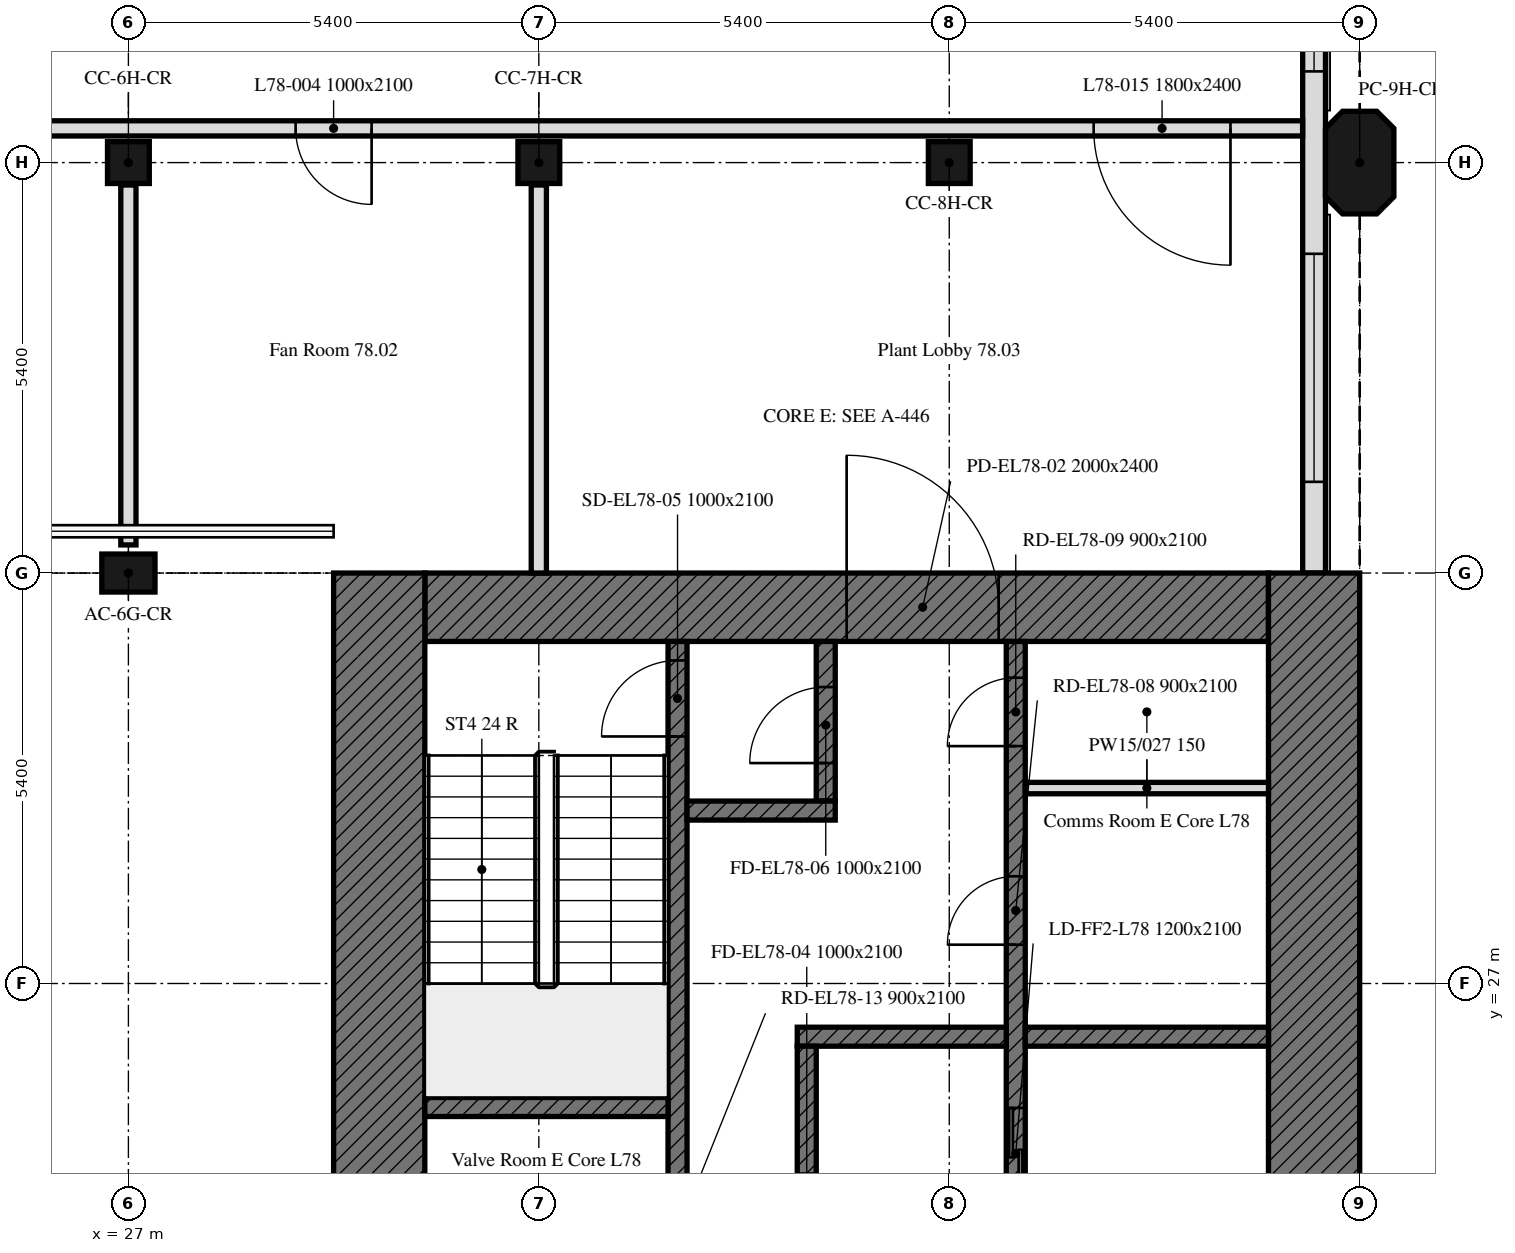
"""IFC4 building model, lengths in metres.
Left out: names, types, materials, properties, quantities, classifications, styles, units other than length and angle.
Written with IfcOpenShell. Run it as: python <this file> out.ifc"""

import sys

from ifc_helpers import new_model, si_unit, direction, frame, frame_2d, origin, origin_2d, place, context, subcontext, project, spatial, polyline, rectangle, outline, extrude, element, fill, save


model = new_model("IFC4")
c1 = context("Model", 3, precision=1e-05, world=origin(), true_north=direction((0.0, 1.0)))
c2 = subcontext(c1, "Body", "Model", "MODEL_VIEW")
j1 = project(units=[si_unit("LENGTHUNIT", "METRE"), si_unit("PLANEANGLEUNIT", "RADIAN")], contexts=[c1])
p1 = place(None, origin())
s1 = spatial("IfcSite", under=j1, at=p1, CompositionType="ELEMENT")
p2 = place(p1, origin())
s2 = spatial("IfcBuilding", under=s1, at=p2, CompositionType="ELEMENT")
p3 = place(p2, frame((0.0, 0.0, 312.7)))
s3 = spatial("IfcBuildingStorey", under=s2, at=p3, CompositionType="ELEMENT", Elevation=312.7)
p4 = place(p3, frame((27.0, 32.4, 0.0), z_axis=(0.0, 0.0, 1.0), x_axis=(1.0, 0.0, 0.0)))
e1 = element("IfcColumn", 1, at=p4, inside=s3, PredefinedType="COLUMN", context=c2, shape_type="SweptSolid", body=[
    extrude(rectangle(XDim=0.7, YDim=0.5, at=origin_2d()), origin(), (0.0, 0.0, 1.0), 4.2),
])
for number, where, z_axis, x_axis in (
    (2, (27.0, 37.8, 0.0), (0.0, 0.0, 1.0), (1.0, 0.0, 0.0)),
    (3, (32.4, 37.8, 0.0), (0.0, 0.0, 1.0), (1.0, 0.0, 0.0)),
    (4, (37.8, 37.8, 0.0), (0.0, 0.0, 1.0), (1.0, 0.0, 0.0)),
):
    element("IfcColumn", number, at=place(p3, frame(where, z_axis=z_axis, x_axis=x_axis)), inside=s3, PredefinedType="COLUMN", context=c2, shape_type="SweptSolid", body=[
        extrude(rectangle(XDim=0.55, YDim=0.55, at=origin_2d()), origin(), (0.0, 0.0, 1.0), 4.2),
    ])
p5 = place(p3, frame((43.2, 37.8, 0.0), z_axis=(0.0, 0.0, 1.0), x_axis=(0.0, 1.0, 0.0)))
e5 = element("IfcColumn", 5, at=p5, inside=s3, PredefinedType="COLUMN", context=c2, shape_type="SweptSolid", body=[
    extrude(outline(polyline([(-0.45, -0.45), (0.45, -0.45), (0.675, -0.225), (0.675, 0.225), (0.45, 0.45), (-0.45, 0.45), (-0.675, 0.225), (-0.675, -0.225), (-0.45, -0.45)])), origin(), (0.0, 0.0, 1.0), 4.2),
])
p6 = place(p3, frame((42.6, 32.4, 0.0), z_axis=(0.0, 0.0, 1.0), x_axis=(0.0, 1.0, 0.0)))
e6 = element("IfcWall", 6, at=p6, inside=s3, PredefinedType="SOLIDWALL", context=c2, shape_type="SweptSolid", body=[
    extrude(outline(polyline([(0.0, 0.0), (10.614, 0.0), (10.614, 4.2), (10.024, 4.2), (9.434, 4.2), (8.845, 4.2), (8.255, 4.2), (7.665, 4.2), (7.076, 4.2), (6.486, 4.2), (5.896, 4.2), (5.307, 4.2), (4.717, 4.2), (4.127, 4.2), (3.538, 4.2), (2.948, 4.2), (2.359, 4.2), (1.769, 4.2), (1.179, 4.2), (0.59, 4.2), (0.0, 4.2), (0.0, 0.0)])), frame((0.0, 0.15, 0.0), z_axis=(0.0, -1.0, 0.0), x_axis=(1.0, 0.0, 0.0)), (0.0, 0.0, 1.0), 0.3),
])
p7 = place(p6, frame((1.2, 0.0, 0.6)))
e7 = element("IfcOpeningElement", 7, at=p7, cuts=e6, PredefinedType="OPENING", context=c2, shape_type="SweptSolid", body=[
    extrude(rectangle(XDim=3.0, YDim=1.8, at=frame_2d((1.5, 0.9))), frame((0.0, 0.16, 0.0), z_axis=(0.0, -1.0, 0.0), x_axis=(1.0, 0.0, 0.0)), (0.0, 0.0, 1.0), 0.32),
])
p8 = place(p6, frame((6.6, 0.0, 0.6)))
e8 = element("IfcOpeningElement", 8, at=p8, cuts=e6, PredefinedType="OPENING", context=c2, shape_type="SweptSolid", body=[
    extrude(rectangle(XDim=3.0, YDim=1.8, at=frame_2d((1.5, 0.9))), frame((0.0, 0.16, 0.0), z_axis=(0.0, -1.0, 0.0), x_axis=(1.0, 0.0, 0.0)), (0.0, 0.0, 1.0), 0.32),
])
p9 = place(p3, frame((30.9, 31.95, 0.0), z_axis=(0.0, 0.0, 1.0), x_axis=(1.0, 0.0, 0.0)))
e9 = element("IfcWall", 9, at=p9, inside=s3, PredefinedType="SOLIDWALL", context=c2, shape_type="SweptSolid", body=[
    extrude(rectangle(XDim=11.1, YDim=0.9, at=frame_2d((5.55, 0.0))), origin(), (0.0, 0.0, 1.0), 4.2),
])
p10 = place(p9, frame((5.55, 0.0, 0.0)))
e10 = element("IfcOpeningElement", 10, at=p10, cuts=e9, PredefinedType="OPENING", context=c2, shape_type="SweptSolid", body=[
    extrude(rectangle(XDim=2.0, YDim=2.4, at=frame_2d((1.0, 1.2))), frame((0.0, 0.45, 0.0), z_axis=(0.0, -1.0, 0.0), x_axis=(1.0, 0.0, 0.0)), (0.0, 0.0, 1.0), 0.9),
])
for number, where, z_axis, x_axis in (
    (11, (42.6, 32.4, 0.0), (0.0, 0.0, 1.0), (0.0, -1.0, 0.0)),
    (12, (30.3, 16.2, 0.0), (0.0, 0.0, 1.0), (0.0, 1.0, 0.0)),
):
    element("IfcWall", number, at=place(p3, frame(where, z_axis=z_axis, x_axis=x_axis)), inside=s3, PredefinedType="SOLIDWALL", context=c2, shape_type="SweptSolid", body=[
        extrude(rectangle(XDim=16.2, YDim=1.2, at=frame_2d((8.1, 0.0))), origin(), (0.0, 0.0, 1.0), 4.2),
    ])
p11 = place(p3, frame((38.675, 17.1, 0.0), z_axis=(0.0, 0.0, 1.0), x_axis=(0.0, 1.0, 0.0)))
e13 = element("IfcWall", 13, at=p11, inside=s3, PredefinedType="SOLIDWALL", context=c2, shape_type="SweptSolid", body=[
    extrude(rectangle(XDim=14.4, YDim=0.25, at=frame_2d((7.2, 0.0))), origin(), (0.0, 0.0, 1.0), 4.2),
])
p12 = place(p11, frame((4.6, 0.0, 0.0)))
e14 = element("IfcOpeningElement", 14, at=p12, cuts=e13, PredefinedType="OPENING", context=c2, shape_type="SweptSolid", body=[
    extrude(rectangle(XDim=1.0, YDim=2.1, at=frame_2d((0.5, 1.05))), frame((0.0, 0.125, 0.0), z_axis=(0.0, -1.0, 0.0), x_axis=(1.0, 0.0, 0.0)), (0.0, 0.0, 1.0), 0.25),
])
p13 = place(p11, frame((7.062, 0.0, 0.0)))
e15 = element("IfcOpeningElement", 15, at=p13, cuts=e13, PredefinedType="OPENING", context=c2, shape_type="SweptSolid", body=[
    extrude(rectangle(XDim=1.2, YDim=2.1, at=frame_2d((0.6, 1.05))), frame((0.0, 0.125, 0.0), z_axis=(0.0, -1.0, 0.0), x_axis=(1.0, 0.0, 0.0)), (0.0, 0.0, 1.0), 0.25),
])
p14 = place(p11, frame((10.41, 0.0, 0.0)))
e16 = element("IfcOpeningElement", 16, at=p14, cuts=e13, PredefinedType="OPENING", context=c2, shape_type="SweptSolid", body=[
    extrude(rectangle(XDim=0.9, YDim=2.1, at=frame_2d((0.45, 1.05))), frame((0.0, 0.125, 0.0), z_axis=(0.0, -1.0, 0.0), x_axis=(1.0, 0.0, 0.0)), (0.0, 0.0, 1.0), 0.25),
])
p15 = place(p11, frame((13.023, 0.0, 0.0)))
e17 = element("IfcOpeningElement", 17, at=p15, cuts=e13, PredefinedType="OPENING", context=c2, shape_type="SweptSolid", body=[
    extrude(rectangle(XDim=0.9, YDim=2.1, at=frame_2d((0.45, 1.05))), frame((0.0, 0.125, 0.0), z_axis=(0.0, -1.0, 0.0), x_axis=(1.0, 0.0, 0.0)), (0.0, 0.0, 1.0), 0.25),
])
p16 = place(p3, frame((34.225, 17.1, 0.0), z_axis=(0.0, 0.0, 1.0), x_axis=(0.0, 1.0, 0.0)))
e18 = element("IfcWall", 18, at=p16, inside=s3, PredefinedType="SOLIDWALL", context=c2, shape_type="SweptSolid", body=[
    extrude(rectangle(XDim=14.4, YDim=0.25, at=frame_2d((7.2, 0.0))), origin(), (0.0, 0.0, 1.0), 4.2),
])
p17 = place(p16, frame((13.15, 0.0, 0.0)))
e19 = element("IfcOpeningElement", 19, at=p17, cuts=e18, PredefinedType="OPENING", context=c2, shape_type="SweptSolid", body=[
    extrude(rectangle(XDim=1.0, YDim=2.1, at=frame_2d((0.5, 1.05))), frame((0.0, 0.125, 0.0), z_axis=(0.0, -1.0, 0.0), x_axis=(1.0, 0.0, 0.0)), (0.0, 0.0, 1.0), 0.25),
])
p18 = place(p16, frame((0.482, 0.0, 0.0)))
e20 = element("IfcOpeningElement", 20, at=p18, cuts=e18, PredefinedType="OPENING", context=c2, shape_type="SweptSolid", body=[
    extrude(rectangle(XDim=0.9, YDim=2.1, at=frame_2d((0.45, 1.05))), frame((0.0, 0.125, 0.0), z_axis=(0.0, -1.0, 0.0), x_axis=(1.0, 0.0, 0.0)), (0.0, 0.0, 1.0), 0.25),
])
p19 = place(p16, frame((2.218, 0.0, 0.0)))
e21 = element("IfcOpeningElement", 21, at=p19, cuts=e18, PredefinedType="OPENING", context=c2, shape_type="SweptSolid", body=[
    extrude(rectangle(XDim=0.9, YDim=2.1, at=frame_2d((0.45, 1.05))), frame((0.0, 0.125, 0.0), z_axis=(0.0, -1.0, 0.0), x_axis=(1.0, 0.0, 0.0)), (0.0, 0.0, 1.0), 0.25),
])
p20 = place(p16, frame((3.71, 0.0, 0.0)))
e22 = element("IfcOpeningElement", 22, at=p20, cuts=e18, PredefinedType="OPENING", context=c2, shape_type="SweptSolid", body=[
    extrude(rectangle(XDim=0.9, YDim=2.1, at=frame_2d((0.45, 1.05))), frame((0.0, 0.125, 0.0), z_axis=(0.0, -1.0, 0.0), x_axis=(1.0, 0.0, 0.0)), (0.0, 0.0, 1.0), 0.25),
])
p21 = place(p16, frame((6.175, 0.0, 0.0)))
e23 = element("IfcOpeningElement", 23, at=p21, cuts=e18, PredefinedType="OPENING", context=c2, shape_type="SweptSolid", body=[
    extrude(rectangle(XDim=0.9, YDim=2.1, at=frame_2d((0.45, 1.05))), frame((0.0, 0.125, 0.0), z_axis=(0.0, -1.0, 0.0), x_axis=(1.0, 0.0, 0.0)), (0.0, 0.0, 1.0), 0.25),
])
p22 = place(p3, frame((30.9, 25.375, 0.0), z_axis=(0.0, 0.0, 1.0), x_axis=(1.0, 0.0, 0.0)))
e24 = element("IfcWall", 24, at=p22, inside=s3, PredefinedType="SOLIDWALL", context=c2, shape_type="SweptSolid", body=[
    extrude(rectangle(XDim=3.2, YDim=0.25, at=frame_2d((1.6, 0.0))), origin(), (0.0, 0.0, 1.0), 4.2),
])
p23 = place(p3, frame((38.8, 26.3, 0.0), z_axis=(0.0, 0.0, 1.0), x_axis=(1.0, 0.0, 0.0)))
e25 = element("IfcWall", 25, at=p23, inside=s3, PredefinedType="SOLIDWALL", context=c2, shape_type="SweptSolid", body=[
    extrude(rectangle(XDim=3.2, YDim=0.25, at=frame_2d((1.6, 0.0))), origin(), (0.0, 0.0, 1.0), 4.2),
])
p24 = place(p3, frame((35.8, 26.3, 0.0), z_axis=(0.0, 0.0, 1.0), x_axis=(1.0, 0.0, 0.0)))
e26 = element("IfcWall", 26, at=p24, inside=s3, PredefinedType="SOLIDWALL", context=c2, shape_type="SweptSolid", body=[
    extrude(rectangle(XDim=2.75, YDim=0.25, at=frame_2d((1.375, 0.0))), origin(), (0.0, 0.0, 1.0), 4.2),
])
p25 = place(p3, frame((36.175, 29.4, 0.0), z_axis=(0.0, 0.0, 1.0), x_axis=(0.0, 1.0, 0.0)))
e27 = element("IfcWall", 27, at=p25, inside=s3, PredefinedType="SOLIDWALL", context=c2, shape_type="SweptSolid", body=[
    extrude(rectangle(XDim=2.1, YDim=0.25, at=frame_2d((1.05, 0.0))), origin(), (0.0, 0.0, 1.0), 4.2),
])
p26 = place(p25, frame((0.5, 0.0, 0.0)))
e28 = element("IfcOpeningElement", 28, at=p26, cuts=e27, PredefinedType="OPENING", context=c2, shape_type="SweptSolid", body=[
    extrude(rectangle(XDim=1.0, YDim=2.1, at=frame_2d((0.5, 1.05))), frame((0.0, 0.125, 0.0), z_axis=(0.0, -1.0, 0.0), x_axis=(1.0, 0.0, 0.0)), (0.0, 0.0, 1.0), 0.25),
])
p27 = place(p3, frame((34.35, 29.275, 0.0), z_axis=(0.0, 0.0, 1.0), x_axis=(1.0, 0.0, 0.0)))
e29 = element("IfcWall", 29, at=p27, inside=s3, PredefinedType="SOLIDWALL", context=c2, shape_type="SweptSolid", body=[
    extrude(rectangle(XDim=1.95, YDim=0.25, at=frame_2d((0.975, 0.0))), origin(), (0.0, 0.0, 1.0), 4.2),
])
p28 = place(p3, frame((35.925, 20.55, 0.0), z_axis=(0.0, 0.0, 1.0), x_axis=(0.0, 1.0, 0.0)))
e30 = element("IfcWall", 30, at=p28, inside=s3, PredefinedType="SOLIDWALL", context=c2, shape_type="SweptSolid", body=[
    extrude(rectangle(XDim=5.625, YDim=0.25, at=frame_2d((2.812, 0.0))), origin(), (0.0, 0.0, 1.0), 4.2),
])
p29 = place(p28, frame((2.95, 0.0, 0.0)))
e31 = element("IfcOpeningElement", 31, at=p29, cuts=e30, PredefinedType="OPENING", context=c2, shape_type="SweptSolid", body=[
    extrude(rectangle(XDim=1.0, YDim=2.1, at=frame_2d((0.5, 1.05))), frame((0.0, 0.125, 0.0), z_axis=(0.0, -1.0, 0.0), x_axis=(1.0, 0.0, 0.0)), (0.0, 0.0, 1.0), 0.25),
])
p30 = place(p3, frame((38.8, 29.571, 0.0), z_axis=(0.0, 0.0, 1.0), x_axis=(1.0, 0.0, 0.0)))
e32 = element("IfcWall", 32, at=p30, inside=s3, PredefinedType="PARTITIONING", context=c2, shape_type="SweptSolid", body=[
    extrude(rectangle(XDim=3.2, YDim=0.15, at=frame_2d((1.6, 0.0))), origin(), (0.0, 0.0, 1.0), 4.2),
])
p31 = place(p3, frame((32.4, 32.4, 0.0), z_axis=(0.0, 0.0, 1.0), x_axis=(0.0, 1.0, 0.0)))
e33 = element("IfcWall", 33, at=p31, inside=s3, PredefinedType="PARTITIONING", context=c2, shape_type="SweptSolid", body=[
    extrude(rectangle(XDim=5.105, YDim=0.2, at=frame_2d((2.552, 0.0))), origin(), (0.0, 0.0, 1.0), 3.45),
])
p32 = place(p3, frame((27.0, 37.505, 0.0), z_axis=(0.0, 0.0, 1.0), x_axis=(0.0, -1.0, 0.0)))
e34 = element("IfcWall", 34, at=p32, inside=s3, PredefinedType="PARTITIONING", context=c2, shape_type="SweptSolid", body=[
    extrude(rectangle(XDim=4.735, YDim=0.2, at=frame_2d((2.367, 0.0))), origin(), (0.0, 0.0, 1.0), 3.45),
])
p33 = place(p3, frame((42.449, 38.25, 0.0), z_axis=(0.0, 0.0, 1.0), x_axis=(-1.0, 0.0, 0.0)))
e35 = element("IfcWall", 35, at=p33, inside=s3, PredefinedType="PARTITIONING", context=c2, shape_type="SweptSolid", body=[
    extrude(rectangle(XDim=37.049, YDim=0.2, at=frame_2d((18.524, 0.0))), origin(), (0.0, 0.0, 1.0), 3.45),
])
p34 = place(p33, frame((12.249, 0.0, 0.0)))
e36 = element("IfcOpeningElement", 36, at=p34, cuts=e35, PredefinedType="OPENING", context=c2, shape_type="SweptSolid", body=[
    extrude(rectangle(XDim=1.0, YDim=2.1, at=frame_2d((0.5, 1.05))), frame((0.0, 0.1, 0.0), z_axis=(0.0, -1.0, 0.0), x_axis=(1.0, 0.0, 0.0)), (0.0, 0.0, 1.0), 0.2),
])
p35 = place(p33, frame((23.032, 0.0, 0.0)))
e37 = element("IfcOpeningElement", 37, at=p35, cuts=e35, PredefinedType="OPENING", context=c2, shape_type="SweptSolid", body=[
    extrude(rectangle(XDim=1.0, YDim=2.1, at=frame_2d((0.5, 1.05))), frame((0.0, 0.1, 0.0), z_axis=(0.0, -1.0, 0.0), x_axis=(1.0, 0.0, 0.0)), (0.0, 0.0, 1.0), 0.2),
])
p36 = place(p33, frame((0.949, 0.0, 0.0)))
e38 = element("IfcOpeningElement", 38, at=p36, cuts=e35, PredefinedType="OPENING", context=c2, shape_type="SweptSolid", body=[
    extrude(rectangle(XDim=1.8, YDim=2.4, at=frame_2d((0.9, 1.2))), frame((0.0, 0.1, 0.0), z_axis=(0.0, -1.0, 0.0), x_axis=(1.0, 0.0, 0.0)), (0.0, 0.0, 1.0), 0.2),
])
p37 = place(p33, frame((27.949, 0.0, 0.0)))
e39 = element("IfcOpeningElement", 39, at=p37, cuts=e35, PredefinedType="OPENING", context=c2, shape_type="SweptSolid", body=[
    extrude(rectangle(XDim=1.8, YDim=2.4, at=frame_2d((0.9, 1.2))), frame((0.0, 0.1, 0.0), z_axis=(0.0, -1.0, 0.0), x_axis=(1.0, 0.0, 0.0)), (0.0, 0.0, 1.0), 0.2),
])
p38 = place(p7, origin())
e40 = element("IfcWindow", 40, at=p38, inside=s3, PartitioningType="SINGLE_PANEL", PredefinedType="WINDOW", context=c2, shape_type="SweptSolid", body=[
    extrude(rectangle(XDim=3.0, YDim=1.8, at=frame_2d((1.5, 0.9))), frame((0.0, 0.03, 0.0), z_axis=(0.0, -1.0, 0.0), x_axis=(1.0, 0.0, 0.0)), (0.0, 0.0, 1.0), 0.06),
])
fill(e7, e40)
p39 = place(p8, origin())
e41 = element("IfcWindow", 41, at=p39, inside=s3, PartitioningType="SINGLE_PANEL", PredefinedType="WINDOW", context=c2, shape_type="SweptSolid", body=[
    extrude(rectangle(XDim=3.0, YDim=1.8, at=frame_2d((1.5, 0.9))), frame((0.0, 0.03, 0.0), z_axis=(0.0, -1.0, 0.0), x_axis=(1.0, 0.0, 0.0)), (0.0, 0.0, 1.0), 0.06),
])
fill(e8, e41)
p40 = place(p10, origin())
e42 = element("IfcDoor", 42, at=p40, inside=s3, OperationType="DOUBLE_DOOR_SINGLE_SWING", PredefinedType="DOOR", context=c2, shape_type="SweptSolid", body=[
    extrude(rectangle(XDim=2.0, YDim=2.4, at=frame_2d((1.0, 1.2))), frame((0.0, 0.025, 0.0), z_axis=(0.0, -1.0, 0.0), x_axis=(1.0, 0.0, 0.0)), (0.0, 0.0, 1.0), 0.05),
])
fill(e10, e42)
p41 = place(p17, origin())
e43 = element("IfcDoor", 43, at=p41, inside=s3, OperationType="SINGLE_SWING_LEFT", PredefinedType="DOOR", context=c2, shape_type="SweptSolid", body=[
    extrude(rectangle(XDim=1.0, YDim=2.1, at=frame_2d((0.5, 1.05))), frame((0.0, 0.025, 0.0), z_axis=(0.0, -1.0, 0.0), x_axis=(1.0, 0.0, 0.0)), (0.0, 0.0, 1.0), 0.05),
])
fill(e19, e43)
p42 = place(p26, origin())
e44 = element("IfcDoor", 44, at=p42, inside=s3, OperationType="SINGLE_SWING_LEFT", PredefinedType="DOOR", context=c2, shape_type="SweptSolid", body=[
    extrude(rectangle(XDim=1.0, YDim=2.1, at=frame_2d((0.5, 1.05))), frame((0.0, 0.025, 0.0), z_axis=(0.0, -1.0, 0.0), x_axis=(1.0, 0.0, 0.0)), (0.0, 0.0, 1.0), 0.05),
])
fill(e28, e44)
p43 = place(p13, origin())
e45 = element("IfcDoor", 45, at=p43, inside=s3, OperationType="DOUBLE_DOOR_SLIDING", PredefinedType="DOOR", context=c2, shape_type="SweptSolid", body=[
    extrude(rectangle(XDim=1.2, YDim=2.1, at=frame_2d((0.6, 1.05))), frame((0.0, 0.025, 0.0), z_axis=(0.0, -1.0, 0.0), x_axis=(1.0, 0.0, 0.0)), (0.0, 0.0, 1.0), 0.05),
])
fill(e15, e45)
p44 = place(p14, origin())
e46 = element("IfcDoor", 46, at=p44, inside=s3, OperationType="SINGLE_SWING_LEFT", PredefinedType="DOOR", context=c2, shape_type="SweptSolid", body=[
    extrude(rectangle(XDim=0.9, YDim=2.1, at=frame_2d((0.45, 1.05))), frame((0.0, 0.025, 0.0), z_axis=(0.0, -1.0, 0.0), x_axis=(1.0, 0.0, 0.0)), (0.0, 0.0, 1.0), 0.05),
])
fill(e16, e46)
p45 = place(p15, origin())
e47 = element("IfcDoor", 47, at=p45, inside=s3, OperationType="SINGLE_SWING_LEFT", PredefinedType="DOOR", context=c2, shape_type="SweptSolid", body=[
    extrude(rectangle(XDim=0.9, YDim=2.1, at=frame_2d((0.45, 1.05))), frame((0.0, 0.025, 0.0), z_axis=(0.0, -1.0, 0.0), x_axis=(1.0, 0.0, 0.0)), (0.0, 0.0, 1.0), 0.05),
])
fill(e17, e47)
p46 = place(p34, origin())
e48 = element("IfcDoor", 48, at=p46, inside=s3, OperationType="SINGLE_SWING_LEFT", PredefinedType="DOOR", context=c2, shape_type="SweptSolid", body=[
    extrude(rectangle(XDim=1.0, YDim=2.1, at=frame_2d((0.5, 1.05))), frame((0.0, 0.025, 0.0), z_axis=(0.0, -1.0, 0.0), x_axis=(1.0, 0.0, 0.0)), (0.0, 0.0, 1.0), 0.05),
])
fill(e36, e48)
p47 = place(p36, origin())
e49 = element("IfcDoor", 49, at=p47, inside=s3, OperationType="DOUBLE_DOOR_SINGLE_SWING", PredefinedType="DOOR", context=c2, shape_type="SweptSolid", body=[
    extrude(rectangle(XDim=1.8, YDim=2.4, at=frame_2d((0.9, 1.2))), frame((0.0, 0.025, 0.0), z_axis=(0.0, -1.0, 0.0), x_axis=(1.0, 0.0, 0.0)), (0.0, 0.0, 1.0), 0.05),
])
fill(e38, e49)
save(model, sys.argv[1])
